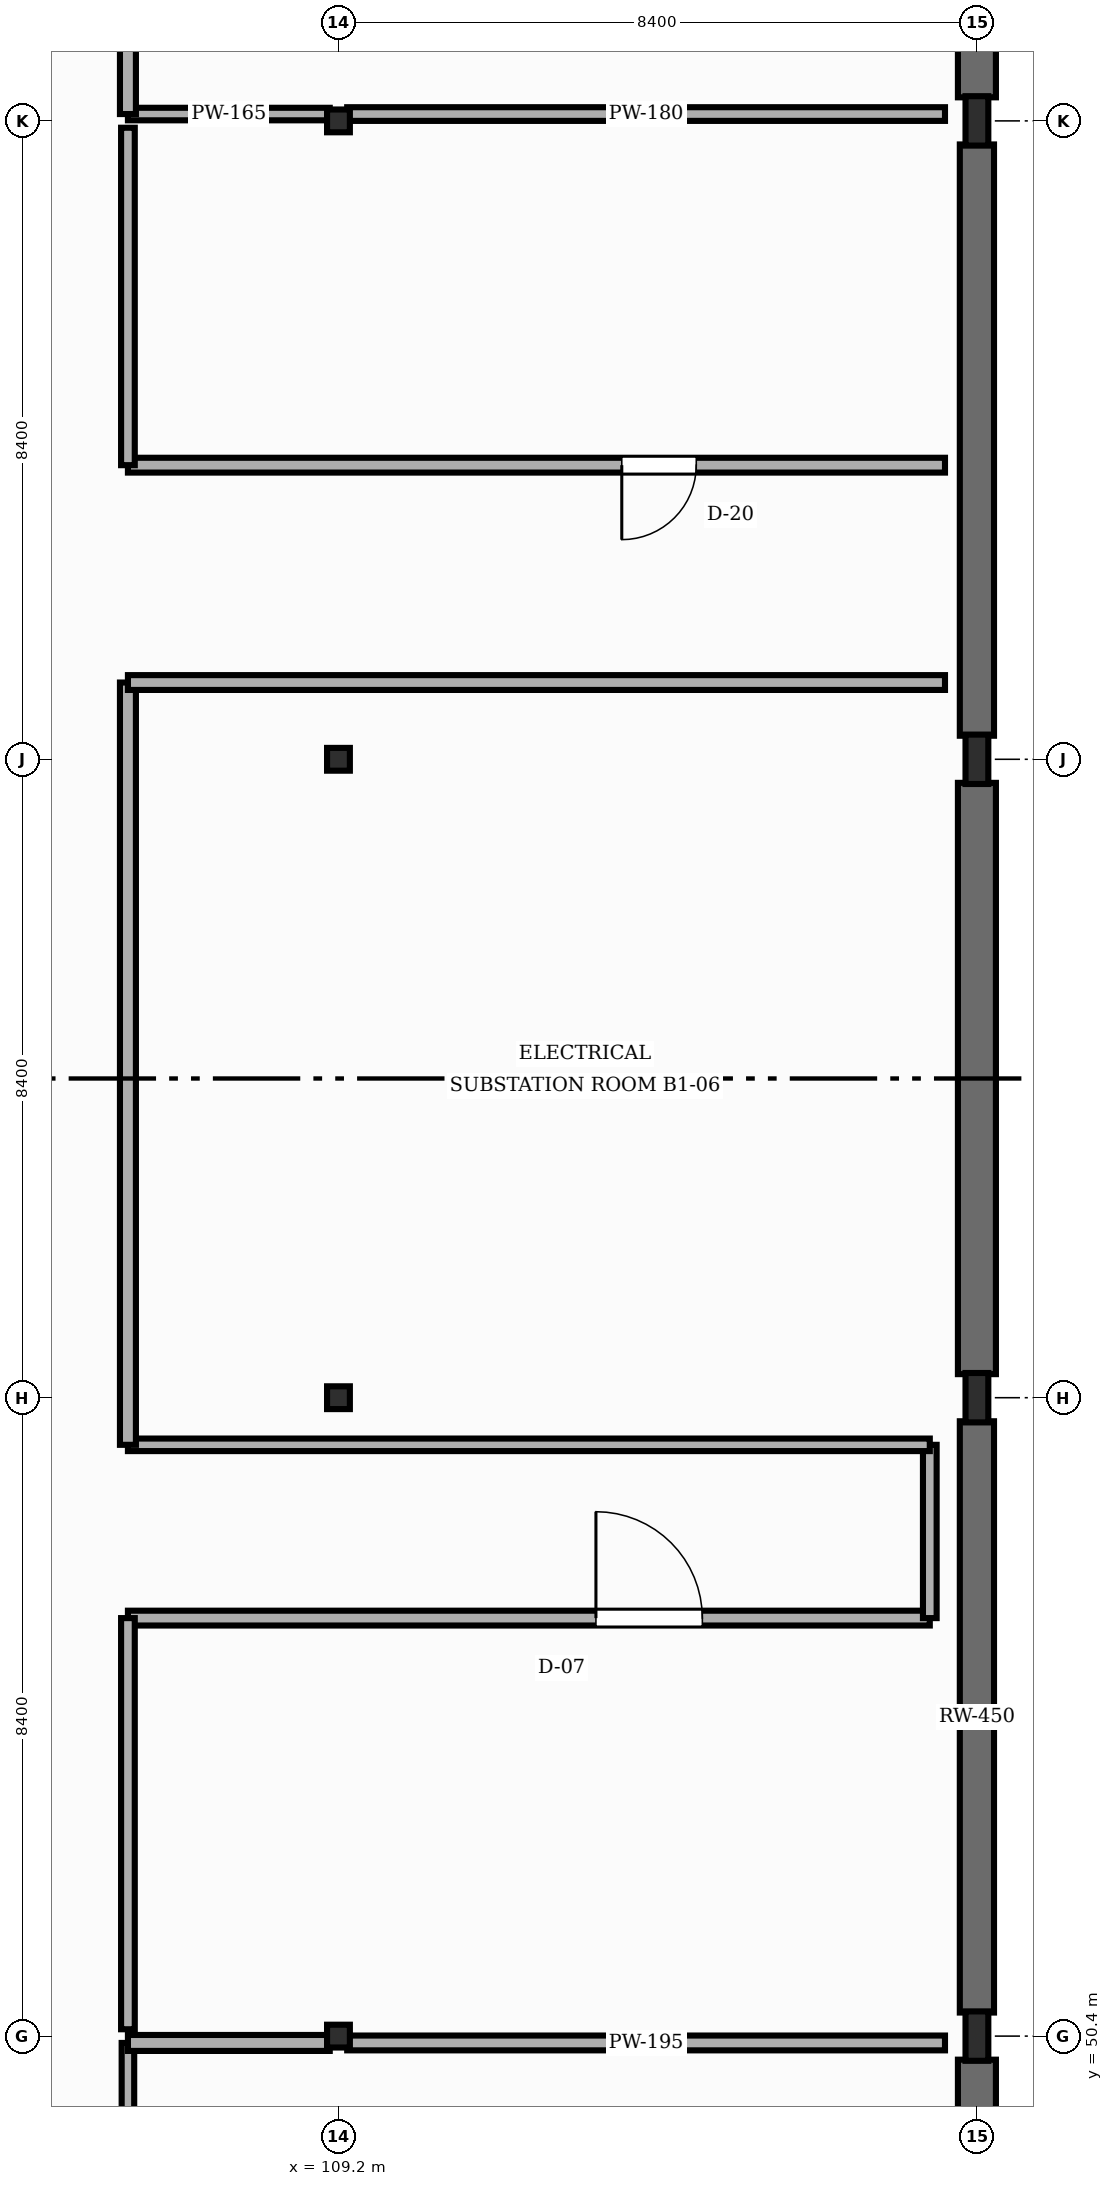
"""IFC4 building model, lengths in metres.
Left out: names, types, materials, properties, quantities, classifications, styles, units other than length and angle.
Written with IfcOpenShell. Run it as: python <this file> out.ifc"""

import sys

from ifc_helpers import new_model, si_unit, direction, frame, frame_2d, origin, origin_2d, place, context, subcontext, project, spatial, rectangle, i_section, extrude, element, fill, save


model = new_model("IFC4")
c1 = context("Model", 3, precision=1e-05, world=origin(), true_north=direction((0.0, 1.0)))
c2 = subcontext(c1, "Body", "Model", "MODEL_VIEW")
j1 = project(units=[si_unit("LENGTHUNIT", "METRE"), si_unit("PLANEANGLEUNIT", "RADIAN")], contexts=[c1])
p1 = place(None, origin())
s1 = spatial("IfcSite", under=j1, at=p1, CompositionType="ELEMENT")
p2 = place(p1, origin())
s2 = spatial("IfcBuilding", under=s1, at=p2, CompositionType="ELEMENT")
p3 = place(p2, frame((0.0, 0.0, -4.5)))
s3 = spatial("IfcBuildingStorey", under=s2, at=p3, CompositionType="ELEMENT", Elevation=-4.5)
for number, where, z_axis, x_axis in (
    (1, (109.2, 50.4, 0.0), (0.0, 0.0, 1.0), (1.0, 0.0, 0.0)),
    (2, (109.2, 58.8, 0.0), (0.0, 0.0, 1.0), (1.0, 0.0, 0.0)),
    (3, (109.2, 67.2, 0.0), (0.0, 0.0, 1.0), (1.0, 0.0, 0.0)),
    (4, (109.2, 75.6, 0.0), (0.0, 0.0, 1.0), (1.0, 0.0, 0.0)),
):
    element("IfcColumn", number, at=place(p3, frame(where, z_axis=z_axis, x_axis=x_axis)), inside=s3, PredefinedType="COLUMN", context=c2, shape_type="SweptSolid", body=[
        extrude(i_section(OverallWidth=0.3, OverallDepth=0.3, WebThickness=0.011, FlangeThickness=0.019, FilletRadius=0.027, at=origin_2d()), origin(), (0.0, 0.0, 1.0), 4.5),
    ])
for number, where, z_axis, x_axis in (
    (5, (117.6, 50.4, 0.0), (0.0, 0.0, 1.0), (1.0, 0.0, 0.0)),
    (6, (117.6, 58.8, 0.0), (0.0, 0.0, 1.0), (1.0, 0.0, 0.0)),
    (7, (117.6, 67.2, 0.0), (0.0, 0.0, 1.0), (1.0, 0.0, 0.0)),
    (8, (117.6, 75.6, 0.0), (0.0, 0.0, 1.0), (1.0, 0.0, 0.0)),
):
    element("IfcColumn", number, at=place(p3, frame(where, z_axis=z_axis, x_axis=x_axis)), inside=s3, PredefinedType="COLUMN", context=c2, shape_type="SweptSolid", body=[
        extrude(i_section(OverallWidth=0.3, OverallDepth=0.65, WebThickness=0.016, FlangeThickness=0.031, FilletRadius=0.027, at=origin_2d()), origin(), (0.0, 0.0, 1.0), 4.5),
    ])
p4 = place(p3, frame((117.6, 42.31, 0.0), z_axis=(0.0, 0.0, 1.0), x_axis=(0.0, 1.0, 0.0)))
e9 = element("IfcWall", 9, at=p4, inside=s3, PredefinedType="USERDEFINED", context=c2, shape_type="SweptSolid", body=[
    extrude(rectangle(XDim=7.78, YDim=0.5, at=frame_2d((3.89, 0.0))), origin(), (0.0, 0.0, 1.0), 4.25),
])
p5 = place(p3, frame((117.6, 50.71, 0.0), z_axis=(0.0, 0.0, 1.0), x_axis=(0.0, 1.0, 0.0)))
e10 = element("IfcWall", 10, at=p5, inside=s3, PredefinedType="USERDEFINED", context=c2, shape_type="SweptSolid", body=[
    extrude(rectangle(XDim=7.78, YDim=0.45, at=frame_2d((3.89, 0.0))), origin(), (0.0, 0.0, 1.0), 4.25),
])
p6 = place(p3, frame((117.6, 59.11, 0.0), z_axis=(0.0, 0.0, 1.0), x_axis=(0.0, 1.0, 0.0)))
e11 = element("IfcWall", 11, at=p6, inside=s3, PredefinedType="USERDEFINED", context=c2, shape_type="SweptSolid", body=[
    extrude(rectangle(XDim=7.78, YDim=0.5, at=frame_2d((3.89, 0.0))), origin(), (0.0, 0.0, 1.0), 4.25),
])
p7 = place(p3, frame((117.6, 67.51, 0.0), z_axis=(0.0, 0.0, 1.0), x_axis=(0.0, 1.0, 0.0)))
e12 = element("IfcWall", 12, at=p7, inside=s3, PredefinedType="USERDEFINED", context=c2, shape_type="SweptSolid", body=[
    extrude(rectangle(XDim=7.78, YDim=0.45, at=frame_2d((3.89, 0.0))), origin(), (0.0, 0.0, 1.0), 4.25),
])
p8 = place(p3, frame((117.6, 75.91, 0.0), z_axis=(0.0, 0.0, 1.0), x_axis=(0.0, 1.0, 0.0)))
e13 = element("IfcWall", 13, at=p8, inside=s3, PredefinedType="USERDEFINED", context=c2, shape_type="SweptSolid", body=[
    extrude(rectangle(XDim=7.78, YDim=0.5, at=frame_2d((3.89, 0.0))), origin(), (0.0, 0.0, 1.0), 4.25),
])
p9 = place(p3, frame((117.18, 75.69, -0.004), z_axis=(0.0, 0.0, 1.0), x_axis=(-1.0, 0.0, 0.0)))
e14 = element("IfcWall", 14, at=p9, inside=s3, PredefinedType="STANDARD", context=c2, shape_type="SweptSolid", body=[
    extrude(rectangle(XDim=7.865, YDim=0.18, at=frame_2d((3.933, 0.0))), origin(), (0.0, 0.0, 1.0), 3.796),
])
p10 = place(p3, frame((109.085, 75.69, -0.004), z_axis=(0.0, 0.0, 1.0), x_axis=(-1.0, 0.0, 0.0)))
e15 = element("IfcWall", 15, at=p10, inside=s3, PredefinedType="STANDARD", context=c2, shape_type="SweptSolid", body=[
    extrude(rectangle(XDim=2.655, YDim=0.165, at=frame_2d((1.328, 0.0))), origin(), (0.0, 0.0, 1.0), 3.636),
])
p11 = place(p3, frame((106.43, 75.69, -0.004), z_axis=(0.0, 0.0, 1.0), x_axis=(0.0, 1.0, 0.0)))
e16 = element("IfcWall", 16, at=p11, inside=s3, PredefinedType="STANDARD", context=c2, shape_type="SweptSolid", body=[
    extrude(rectangle(XDim=5.41, YDim=0.21, at=frame_2d((2.705, 0.0))), origin(), (0.0, 0.0, 1.0), 3.996),
])
p12 = place(p3, frame((106.43, 32.98, -0.004), z_axis=(0.0, 0.0, 1.0), x_axis=(0.0, 1.0, 0.0)))
e17 = element("IfcWall", 17, at=p12, inside=s3, PredefinedType="STANDARD", context=c2, shape_type="SweptSolid", body=[
    extrude(rectangle(XDim=17.33, YDim=0.165, at=frame_2d((8.665, 0.0))), origin(), (0.0, 0.0, 1.0), 3.936),
])
p13 = place(p12, frame((12.407, 0.0, 0.015)))
e18 = element("IfcOpeningElement", 18, at=p13, cuts=e17, PredefinedType="OPENING", context=c2, shape_type="SweptSolid", body=[
    extrude(rectangle(XDim=1.18, YDim=2.06, at=frame_2d((0.59, 1.03))), frame((0.0, 0.093, 0.0), z_axis=(0.0, -1.0, 0.0), x_axis=(1.0, 0.0, 0.0)), (0.0, 0.0, 1.0), 0.185),
])
p14 = place(p3, frame((106.43, 50.31, -0.004), z_axis=(0.0, 0.0, 1.0), x_axis=(1.0, 0.0, 0.0)))
e19 = element("IfcWall", 19, at=p14, inside=s3, PredefinedType="STANDARD", context=c2, shape_type="SweptSolid", body=[
    extrude(rectangle(XDim=2.655, YDim=0.21, at=frame_2d((1.328, 0.0))), origin(), (0.0, 0.0, 1.0), 3.846),
])
p15 = place(p3, frame((109.315, 50.31, -0.004), z_axis=(0.0, 0.0, 1.0), x_axis=(1.0, 0.0, 0.0)))
e20 = element("IfcWall", 20, at=p15, inside=s3, PredefinedType="STANDARD", context=c2, shape_type="SweptSolid", body=[
    extrude(rectangle(XDim=7.865, YDim=0.195, at=frame_2d((3.933, 0.0))), origin(), (0.0, 0.0, 1.0), 3.686),
])
p16 = place(p3, frame((106.43, 55.9, -0.004), z_axis=(0.0, 0.0, 1.0), x_axis=(1.0, 0.0, 0.0)))
e21 = element("IfcWall", 21, at=p16, inside=s3, PredefinedType="STANDARD", context=c2, shape_type="SweptSolid", body=[
    extrude(rectangle(XDim=10.55, YDim=0.195, at=frame_2d((5.275, 0.0))), origin(), (0.0, 0.0, 1.0), 4.254),
])
p17 = place(p16, frame((6.157, 0.0, 0.015)))
e22 = element("IfcOpeningElement", 22, at=p17, cuts=e21, PredefinedType="OPENING", context=c2, shape_type="SweptSolid", body=[
    extrude(rectangle(XDim=1.4, YDim=2.06, at=frame_2d((0.7, 1.03))), frame((0.0, 0.107, 0.0), z_axis=(0.0, -1.0, 0.0), x_axis=(1.0, 0.0, 0.0)), (0.0, 0.0, 1.0), 0.215),
])
p18 = place(p3, frame((116.98, 55.9, -0.004), z_axis=(0.0, 0.0, 1.0), x_axis=(0.0, 1.0, 0.0)))
e23 = element("IfcWall", 23, at=p18, inside=s3, PredefinedType="STANDARD", context=c2, shape_type="SweptSolid", body=[
    extrude(rectangle(XDim=2.28, YDim=0.18, at=frame_2d((1.14, 0.0))), origin(), (0.0, 0.0, 1.0), 4.254),
])
p19 = place(p3, frame((116.98, 58.18, -0.004), z_axis=(0.0, 0.0, 1.0), x_axis=(-1.0, 0.0, 0.0)))
e24 = element("IfcWall", 24, at=p19, inside=s3, PredefinedType="STANDARD", context=c2, shape_type="SweptSolid", body=[
    extrude(rectangle(XDim=10.55, YDim=0.165, at=frame_2d((5.275, 0.0))), origin(), (0.0, 0.0, 1.0), 4.254),
])
p20 = place(p3, frame((106.43, 58.18, -0.004), z_axis=(0.0, 0.0, 1.0), x_axis=(0.0, 1.0, 0.0)))
e25 = element("IfcWall", 25, at=p20, inside=s3, PredefinedType="STANDARD", context=c2, shape_type="SweptSolid", body=[
    extrude(rectangle(XDim=10.03, YDim=0.21, at=frame_2d((5.015, 0.0))), origin(), (0.0, 0.0, 1.0), 3.936),
])
p21 = place(p3, frame((106.43, 68.21, -0.004), z_axis=(0.0, 0.0, 1.0), x_axis=(1.0, 0.0, 0.0)))
e26 = element("IfcWall", 26, at=p21, inside=s3, PredefinedType="STANDARD", context=c2, shape_type="SweptSolid", body=[
    extrude(rectangle(XDim=10.75, YDim=0.195, at=frame_2d((5.375, 0.0))), origin(), (0.0, 0.0, 1.0), 4.254),
])
p22 = place(p3, frame((106.43, 50.49, -0.004), z_axis=(0.0, 0.0, 1.0), x_axis=(0.0, 1.0, 0.0)))
e27 = element("IfcWall", 27, at=p22, inside=s3, PredefinedType="STANDARD", context=c2, shape_type="SweptSolid", body=[
    extrude(rectangle(XDim=5.41, YDim=0.18, at=frame_2d((2.705, 0.0))), origin(), (0.0, 0.0, 1.0), 4.016),
])
p23 = place(p3, frame((117.18, 71.07, -0.004), z_axis=(0.0, 0.0, 1.0), x_axis=(-1.0, 0.0, 0.0)))
e28 = element("IfcWall", 28, at=p23, inside=s3, PredefinedType="STANDARD", context=c2, shape_type="SweptSolid", body=[
    extrude(rectangle(XDim=10.75, YDim=0.195, at=frame_2d((5.375, 0.0))), origin(), (0.0, 0.0, 1.0), 4.254),
])
p24 = place(p23, frame((3.272, 0.0, 0.015)))
e29 = element("IfcOpeningElement", 29, at=p24, cuts=e28, PredefinedType="OPENING", context=c2, shape_type="SweptSolid", body=[
    extrude(rectangle(XDim=0.98, YDim=2.22, at=frame_2d((0.49, 1.11))), frame((0.0, 0.107, 0.0), z_axis=(0.0, -1.0, 0.0), x_axis=(1.0, 0.0, 0.0)), (0.0, 0.0, 1.0), 0.215),
])
p25 = place(p3, frame((106.43, 71.07, -0.004), z_axis=(0.0, 0.0, 1.0), x_axis=(0.0, 1.0, 0.0)))
e30 = element("IfcWall", 30, at=p25, inside=s3, PredefinedType="STANDARD", context=c2, shape_type="SweptSolid", body=[
    extrude(rectangle(XDim=4.44, YDim=0.18, at=frame_2d((2.22, 0.0))), origin(), (0.0, 0.0, 1.0), 3.966),
])
p26 = place(p17, origin())
e31 = element("IfcDoor", 31, at=p26, inside=s3, OperationType="SINGLE_SWING_LEFT", PredefinedType="DOOR", context=c2, shape_type="SweptSolid", body=[
    extrude(rectangle(XDim=1.4, YDim=2.06, at=frame_2d((0.7, 1.03))), frame((0.0, 0.025, 0.0), z_axis=(0.0, -1.0, 0.0), x_axis=(1.0, 0.0, 0.0)), (0.0, 0.0, 1.0), 0.05),
])
fill(e22, e31)
p27 = place(p24, origin())
e32 = element("IfcDoor", 32, at=p27, inside=s3, OperationType="SINGLE_SWING_RIGHT", PredefinedType="DOOR", context=c2, shape_type="SweptSolid", body=[
    extrude(rectangle(XDim=0.98, YDim=2.22, at=frame_2d((0.49, 1.11))), frame((0.0, 0.025, 0.0), z_axis=(0.0, -1.0, 0.0), x_axis=(1.0, 0.0, 0.0)), (0.0, 0.0, 1.0), 0.05),
])
fill(e29, e32)
save(model, sys.argv[1])
